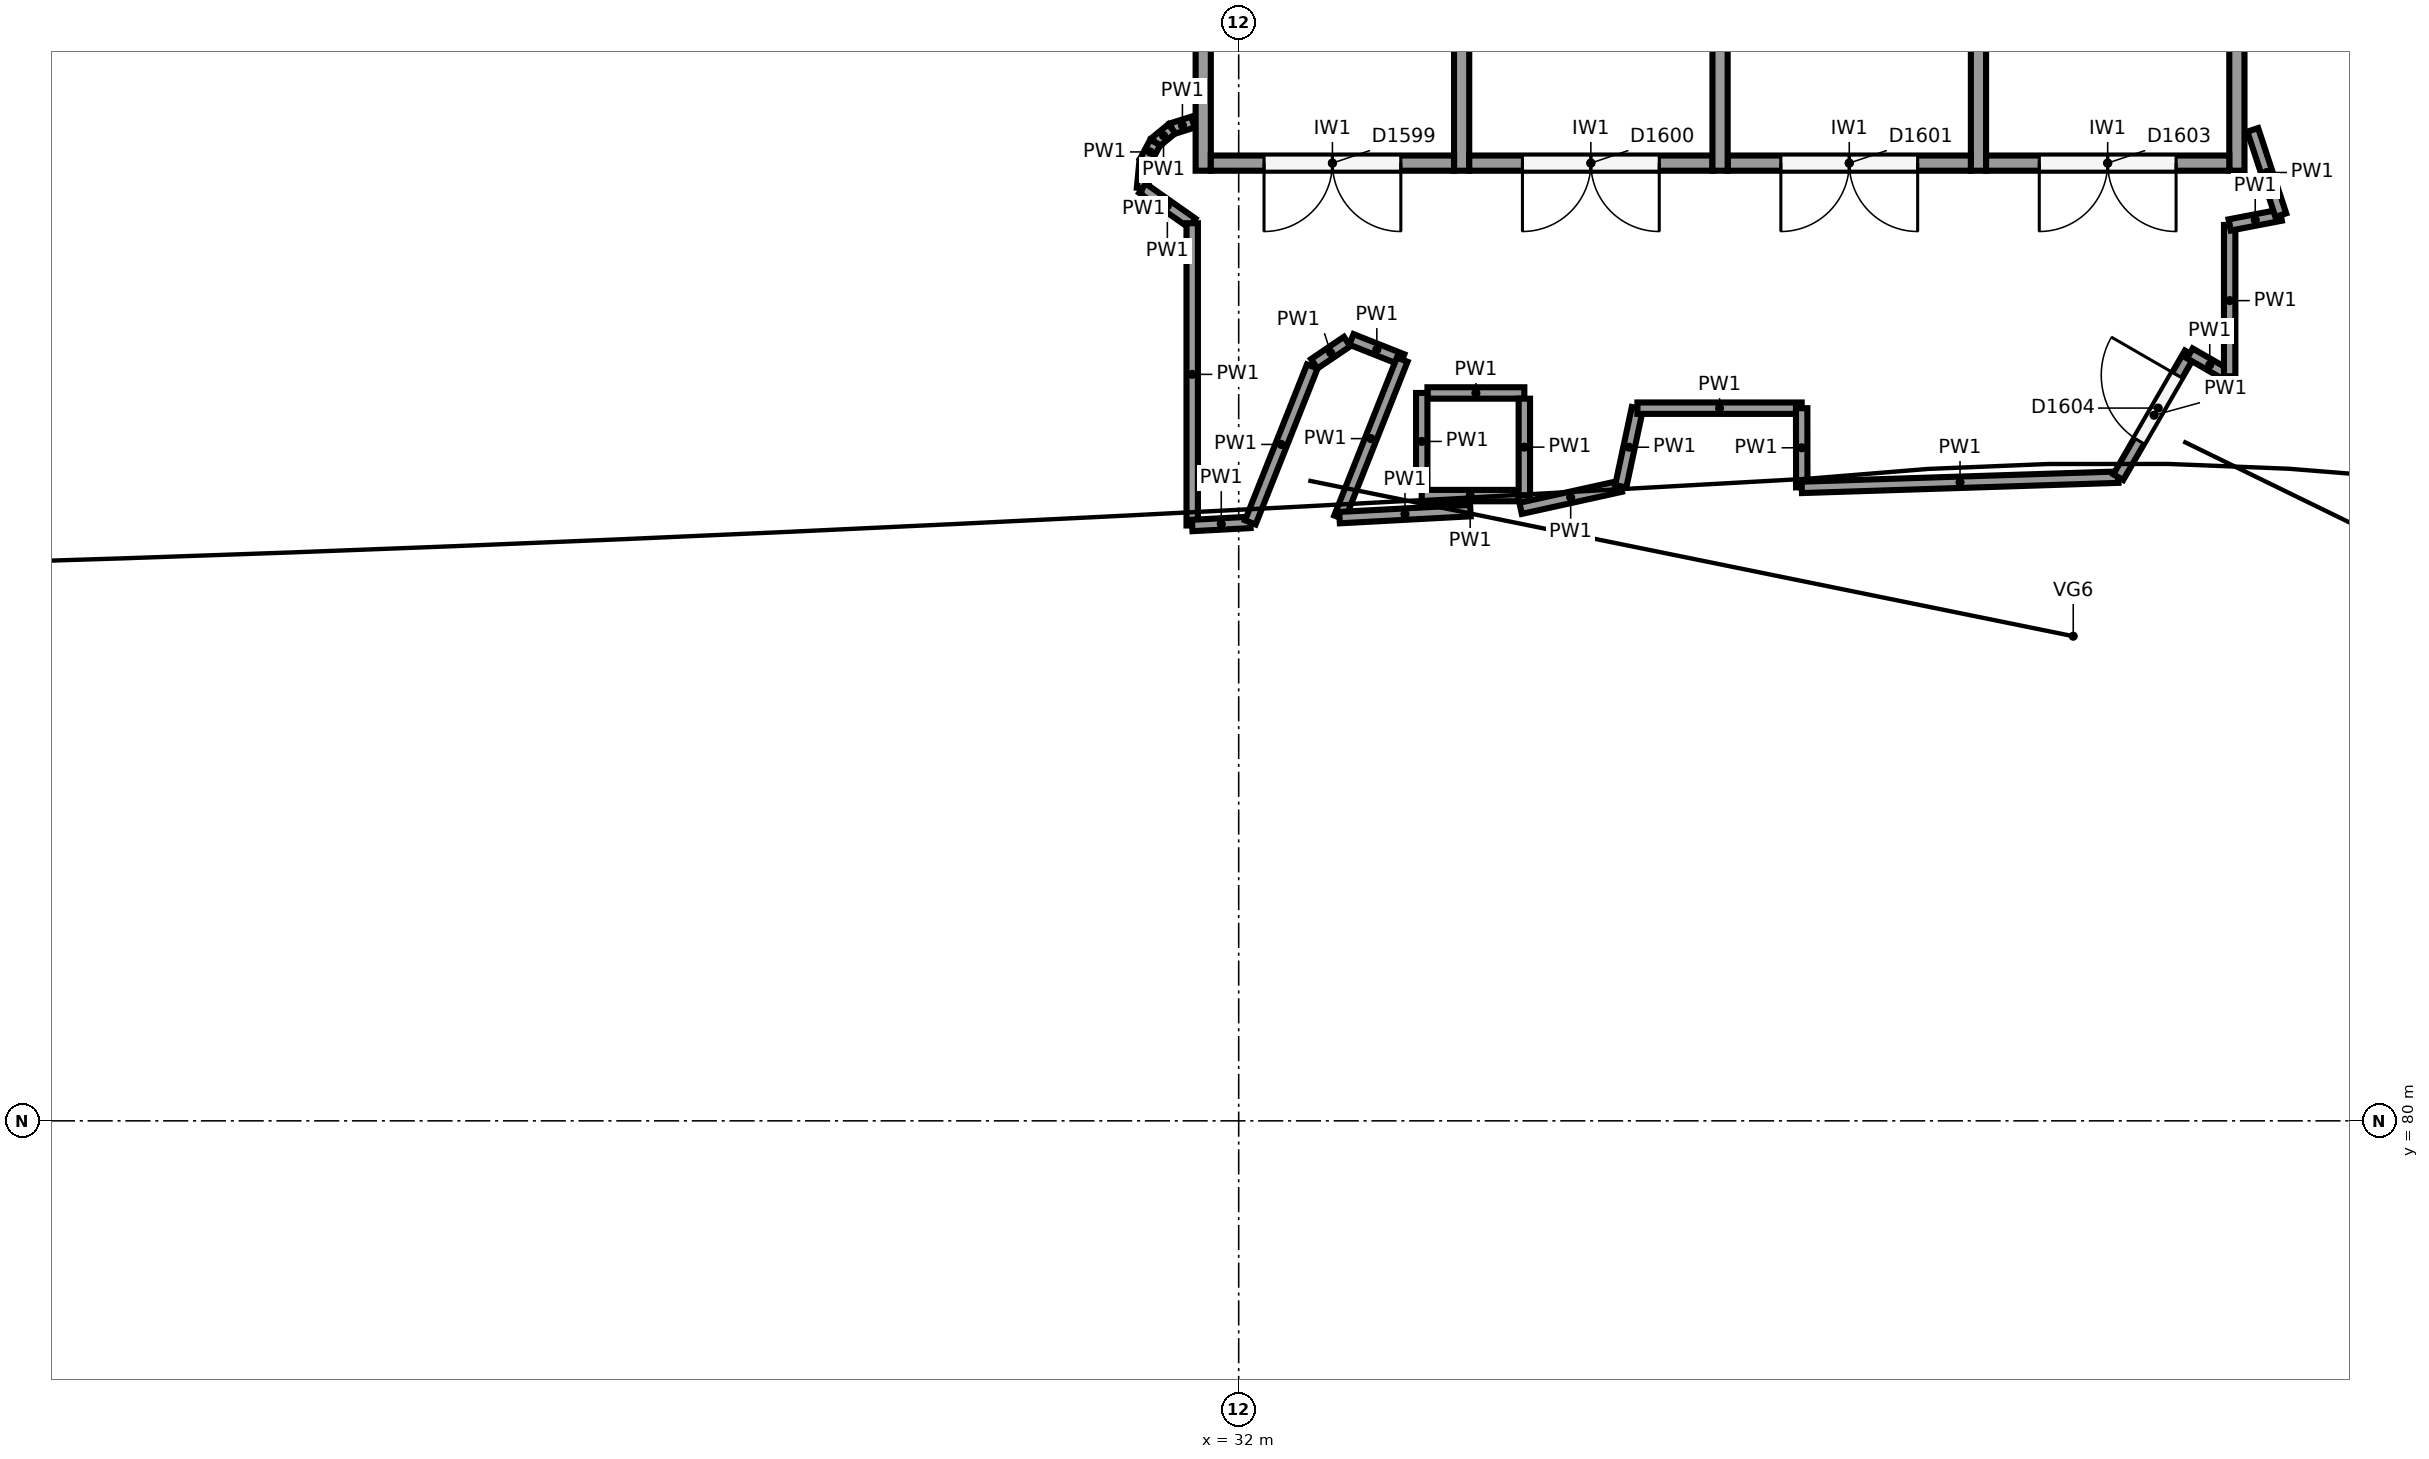
"""IFC4 building model, lengths in metres.
Left out: names, types, materials, properties, quantities, classifications, styles, units other than length and angle.
Written with IfcOpenShell. Run it as: python <this file> out.ifc"""

import sys

from ifc_helpers import new_model, si_unit, direction, frame, frame_2d, origin, origin_2d, place, context, subcontext, project, spatial, rectangle, circle, extrude, element, fill, save


model = new_model("IFC4")
c1 = context("Model", 3, precision=1e-05, world=origin(), true_north=direction((0.0, 1.0)))
c2 = subcontext(c1, "Body", "Model", "MODEL_VIEW")
j1 = project(units=[si_unit("LENGTHUNIT", "METRE"), si_unit("PLANEANGLEUNIT", "RADIAN")], contexts=[c1])
p1 = place(None, origin())
s1 = spatial("IfcSite", under=j1, at=p1, CompositionType="ELEMENT")
p2 = place(p1, origin())
s2 = spatial("IfcBuilding", under=s1, at=p2, CompositionType="ELEMENT")
p3 = place(p2, frame((0.0, 0.0, 24.0)))
s3 = spatial("IfcBuildingStorey", under=s2, at=p3, CompositionType="ELEMENT", Elevation=24.0)
p4 = place(p3, frame((46.333, 90.126, 0.0), z_axis=(0.0, 0.0, 1.0), x_axis=(1.0, 0.0, 0.0)))
e1 = element("IfcColumn", 1, at=p4, inside=s3, PredefinedType="COLUMN", context=c2, shape_type="SweptSolid", body=[
    extrude(circle(Radius=0.45, at=origin_2d()), origin(), (0.0, 0.0, 1.0), 4.15),
])
p5 = place(p3, frame((32.944, 90.551, 0.0), z_axis=(0.0, 0.0, 1.0), x_axis=(1.0, 0.0, 0.0)))
e2 = element("IfcColumn", 2, at=p5, inside=s3, PredefinedType="COLUMN", context=c2, shape_type="SweptSolid", body=[
    extrude(circle(Radius=0.55, at=origin_2d()), origin(), (0.0, 0.0, 1.0), 6.0),
])
p6 = place(p3, frame((20.65, 89.656, 0.0), z_axis=(0.0, 0.0, 1.0), x_axis=(1.0, 0.0, 0.0)))
e3 = element("IfcColumn", 3, at=p6, inside=s3, PredefinedType="COLUMN", context=c2, shape_type="SweptSolid", body=[
    extrude(circle(Radius=0.45, at=origin_2d()), origin(), (0.0, 0.0, 1.0), 4.8),
])
for number, where, z_axis, x_axis in (
    (4, (45.133, 101.6, 0.0), (0.0, 0.0, 1.0), (0.0, -1.0, 0.0)),
    (5, (38.333, 101.6, 0.0), (0.0, 0.0, 1.0), (0.0, -1.0, 0.0)),
    (6, (31.533, 101.6, 0.0), (0.0, 0.0, 1.0), (0.0, -1.0, 0.0)),
    (7, (41.733, 101.6, 0.0), (0.0, 0.0, 1.0), (0.0, -1.0, 0.0)),
    (8, (34.933, 101.6, 0.0), (0.0, 0.0, 1.0), (0.0, -1.0, 0.0)),
):
    element("IfcWall", number, at=place(p3, frame(where, z_axis=z_axis, x_axis=x_axis)), inside=s3, PredefinedType="SHEAR", context=c2, shape_type="SweptSolid", body=[
        extrude(rectangle(XDim=9.1, YDim=0.2, at=frame_2d((4.55, 0.0))), origin(), (0.0, 0.0, 1.0), 5.75),
    ])
p7 = place(p3, frame((45.033, 92.6, 0.0), z_axis=(0.0, 0.0, 1.0), x_axis=(-1.0, 0.0, 0.0)))
e9 = element("IfcWall", 9, at=p7, inside=s3, PredefinedType="SHEAR", context=c2, shape_type="SweptSolid", body=[
    extrude(rectangle(XDim=3.2, YDim=0.2, at=frame_2d((1.6, 0.0))), origin(), (0.0, 0.0, 1.0), 5.75),
])
p8 = place(p7, frame((0.7, 0.0, 0.0)))
e10 = element("IfcOpeningElement", 10, at=p8, cuts=e9, PredefinedType="OPENING", context=c2, shape_type="SweptSolid", body=[
    extrude(rectangle(XDim=1.8, YDim=2.1, at=frame_2d((0.9, 1.05))), frame((0.0, 0.11, 0.0), z_axis=(0.0, -1.0, 0.0), x_axis=(1.0, 0.0, 0.0)), (0.0, 0.0, 1.0), 0.22),
])
p9 = place(p3, frame((41.633, 92.6, 0.0), z_axis=(0.0, 0.0, 1.0), x_axis=(-1.0, 0.0, 0.0)))
e11 = element("IfcWall", 11, at=p9, inside=s3, PredefinedType="SHEAR", context=c2, shape_type="SweptSolid", body=[
    extrude(rectangle(XDim=3.2, YDim=0.2, at=frame_2d((1.6, 0.0))), origin(), (0.0, 0.0, 1.0), 5.75),
])
p10 = place(p9, frame((0.7, 0.0, 0.0)))
e12 = element("IfcOpeningElement", 12, at=p10, cuts=e11, PredefinedType="OPENING", context=c2, shape_type="SweptSolid", body=[
    extrude(rectangle(XDim=1.8, YDim=2.1, at=frame_2d((0.9, 1.05))), frame((0.0, 0.11, 0.0), z_axis=(0.0, -1.0, 0.0), x_axis=(1.0, 0.0, 0.0)), (0.0, 0.0, 1.0), 0.22),
])
p11 = place(p3, frame((38.233, 92.6, 0.0), z_axis=(0.0, 0.0, 1.0), x_axis=(-1.0, 0.0, 0.0)))
e13 = element("IfcWall", 13, at=p11, inside=s3, PredefinedType="SHEAR", context=c2, shape_type="SweptSolid", body=[
    extrude(rectangle(XDim=3.2, YDim=0.2, at=frame_2d((1.6, 0.0))), origin(), (0.0, 0.0, 1.0), 5.75),
])
p12 = place(p11, frame((0.7, 0.0, 0.0)))
e14 = element("IfcOpeningElement", 14, at=p12, cuts=e13, PredefinedType="OPENING", context=c2, shape_type="SweptSolid", body=[
    extrude(rectangle(XDim=1.8, YDim=2.1, at=frame_2d((0.9, 1.05))), frame((0.0, 0.11, 0.0), z_axis=(0.0, -1.0, 0.0), x_axis=(1.0, 0.0, 0.0)), (0.0, 0.0, 1.0), 0.22),
])
p13 = place(p3, frame((34.833, 92.6, 0.0), z_axis=(0.0, 0.0, 1.0), x_axis=(-1.0, 0.0, 0.0)))
e15 = element("IfcWall", 15, at=p13, inside=s3, PredefinedType="SHEAR", context=c2, shape_type="SweptSolid", body=[
    extrude(rectangle(XDim=3.2, YDim=0.2, at=frame_2d((1.6, 0.0))), origin(), (0.0, 0.0, 1.0), 5.75),
])
p14 = place(p13, frame((0.7, 0.0, 0.0)))
e16 = element("IfcOpeningElement", 16, at=p14, cuts=e15, PredefinedType="OPENING", context=c2, shape_type="SweptSolid", body=[
    extrude(rectangle(XDim=1.8, YDim=2.1, at=frame_2d((0.9, 1.05))), frame((0.0, 0.11, 0.0), z_axis=(0.0, -1.0, 0.0), x_axis=(1.0, 0.0, 0.0)), (0.0, 0.0, 1.0), 0.22),
])
p15 = place(p3, frame((35.758, 89.576, 0.0), z_axis=(0.0, 0.0, 1.0), x_axis=(-1.0, 0.0, 0.0)))
e17 = element("IfcWall", 17, at=p15, inside=s3, PredefinedType="PARTITIONING", context=c2, shape_type="SweptSolid", body=[
    extrude(rectangle(XDim=1.275, YDim=0.15, at=frame_2d((0.637, 0.0))), origin(), (0.0, 0.0, 1.0), 5.4),
])
for number, where, z_axis, x_axis in (
    (18, (34.408, 89.576, 0.0), (0.0, 0.0, 1.0), (0.0, -1.0, 0.0)),
    (19, (34.408, 88.226, 0.0), (0.0, 0.0, 1.0), (1.0, 0.0, 0.0)),
    (20, (35.758, 88.226, 0.0), (0.0, 0.0, 1.0), (0.0, 1.0, 0.0)),
):
    element("IfcWall", number, at=place(p3, frame(where, z_axis=z_axis, x_axis=x_axis)), inside=s3, PredefinedType="PARTITIONING", context=c2, shape_type="SweptSolid", body=[
        extrude(rectangle(XDim=1.275, YDim=0.15, at=frame_2d((0.638, 0.0))), origin(), (0.0, 0.0, 1.0), 5.4),
    ])
p16 = place(p3, frame((31.399, 93.139, 0.0), z_axis=(0.0, 0.0, 1.0), x_axis=(-0.954062086302, -0.299608970962, 0.0)))
e21 = element("IfcWall", 21, at=p16, inside=s3, PredefinedType="PARTITIONING", context=c2, shape_type="SweptSolid", body=[
    extrude(rectangle(XDim=0.292, YDim=0.15, at=frame_2d((0.146, 0.0))), origin(), (0.0, 0.0, 1.0), 5.4),
])
p17 = place(p3, frame((31.121, 93.052, 0.0), z_axis=(0.0, 0.0, 1.0), x_axis=(-0.773073370483, -0.634316611678, 0.0)))
e22 = element("IfcWall", 22, at=p17, inside=s3, PredefinedType="PARTITIONING", context=c2, shape_type="SweptSolid", body=[
    extrude(rectangle(XDim=0.283, YDim=0.15, at=frame_2d((0.142, 0.0))), origin(), (0.0, 0.0, 1.0), 5.4),
])
p18 = place(p3, frame((30.902, 92.872, 0.0), z_axis=(0.0, 0.0, 1.0), x_axis=(-0.471169334347, -0.882042775817, 0.0)))
e23 = element("IfcWall", 23, at=p18, inside=s3, PredefinedType="PARTITIONING", context=c2, shape_type="SweptSolid", body=[
    extrude(rectangle(XDim=0.283, YDim=0.15, at=frame_2d((0.142, 0.0))), origin(), (0.0, 0.0, 1.0), 5.4),
])
p19 = place(p3, frame((30.768, 92.622, 0.0), z_axis=(0.0, 0.0, 1.0), x_axis=(-0.094321730408, -0.995541767669, 0.0)))
e24 = element("IfcWall", 24, at=p19, inside=s3, PredefinedType="PARTITIONING", context=c2, shape_type="SweptSolid", body=[
    extrude(rectangle(XDim=0.354, YDim=0.15, at=frame_2d((0.177, 0.0))), origin(), (0.0, 0.0, 1.0), 5.4),
])
p20 = place(p3, frame((30.735, 92.269, 0.0), z_axis=(0.0, 0.0, 1.0), x_axis=(0.817779793702, -0.575531240693, 0.0)))
e25 = element("IfcWall", 25, at=p20, inside=s3, PredefinedType="PARTITIONING", context=c2, shape_type="SweptSolid", body=[
    extrude(rectangle(XDim=0.799, YDim=0.15, at=frame_2d((0.399, 0.0))), origin(), (0.0, 0.0, 1.0), 5.4),
])
p21 = place(p3, frame((31.388, 91.809, 0.0), z_axis=(0.0, 0.0, 1.0), x_axis=(0.0, -1.0, 0.0)))
e26 = element("IfcWall", 26, at=p21, inside=s3, PredefinedType="PARTITIONING", context=c2, shape_type="SweptSolid", body=[
    extrude(rectangle(XDim=3.977, YDim=0.15, at=frame_2d((1.988, 0.0))), origin(), (0.0, 0.0, 1.0), 5.4),
])
p22 = place(p3, frame((31.388, 87.833, 0.0), z_axis=(0.0, 0.0, 1.0), x_axis=(0.998582386306, 0.053227979098, 0.0)))
e27 = element("IfcWall", 27, at=p22, inside=s3, PredefinedType="PARTITIONING", context=c2, shape_type="SweptSolid", body=[
    extrude(rectangle(XDim=0.766, YDim=0.15, at=frame_2d((0.383, 0.0))), origin(), (0.0, 0.0, 1.0), 5.4),
])
p23 = place(p3, frame((32.153, 87.873, 0.0), z_axis=(0.0, 0.0, 1.0), x_axis=(0.369177653247, 0.929358843689, 0.0)))
e28 = element("IfcWall", 28, at=p23, inside=s3, PredefinedType="PARTITIONING", context=c2, shape_type="SweptSolid", body=[
    extrude(rectangle(XDim=2.208, YDim=0.15, at=frame_2d((1.104, 0.0))), origin(), (0.0, 0.0, 1.0), 5.4),
])
p24 = place(p3, frame((33.483, 90.281, 0.0), z_axis=(0.0, 0.0, 1.0), x_axis=(0.929154097391, -0.369692660599, 0.0)))
e29 = element("IfcWall", 29, at=p24, inside=s3, PredefinedType="PARTITIONING", context=c2, shape_type="SweptSolid", body=[
    extrude(rectangle(XDim=0.719, YDim=0.15, at=frame_2d((0.36, 0.0))), origin(), (0.0, 0.0, 1.0), 5.4),
])
p25 = place(p3, frame((34.152, 90.015, 0.0), z_axis=(0.0, 0.0, 1.0), x_axis=(-0.368716786322, -0.929541785766, 0.0)))
e30 = element("IfcWall", 30, at=p25, inside=s3, PredefinedType="PARTITIONING", context=c2, shape_type="SweptSolid", body=[
    extrude(rectangle(XDim=2.237, YDim=0.15, at=frame_2d((1.118, 0.0))), origin(), (0.0, 0.0, 1.0), 5.4),
])
p26 = place(p3, frame((33.327, 87.936, 0.0), z_axis=(0.0, 0.0, 1.0), x_axis=(0.998566510948, 0.053524977473, 0.0)))
e31 = element("IfcWall", 31, at=p26, inside=s3, PredefinedType="PARTITIONING", context=c2, shape_type="SweptSolid", body=[
    extrude(rectangle(XDim=1.724, YDim=0.15, at=frame_2d((0.862, 0.0))), origin(), (0.0, 0.0, 1.0), 5.4),
])
p27 = place(p3, frame((35.709, 88.058, 0.0), z_axis=(0.0, 0.0, 1.0), x_axis=(0.976543359958, 0.215320844608, 0.0)))
e32 = element("IfcWall", 32, at=p27, inside=s3, PredefinedType="PARTITIONING", context=c2, shape_type="SweptSolid", body=[
    extrude(rectangle(XDim=1.349, YDim=0.15, at=frame_2d((0.675, 0.0))), origin(), (0.0, 0.0, 1.0), 5.4),
])
p28 = place(p3, frame((37.027, 88.349, 0.0), z_axis=(0.0, 0.0, 1.0), x_axis=(0.208656251107, 0.97798904333, 0.0)))
e33 = element("IfcWall", 33, at=p28, inside=s3, PredefinedType="PARTITIONING", context=c2, shape_type="SweptSolid", body=[
    extrude(rectangle(XDim=1.051, YDim=0.15, at=frame_2d((0.525, 0.0))), origin(), (0.0, 0.0, 1.0), 5.4),
])
p29 = place(p3, frame((37.246, 89.376, 0.0), z_axis=(0.0, 0.0, 1.0), x_axis=(0.99999999362, -0.000112956059, 0.0)))
e34 = element("IfcWall", 34, at=p29, inside=s3, PredefinedType="PARTITIONING", context=c2, shape_type="SweptSolid", body=[
    extrude(rectangle(XDim=2.161, YDim=0.15, at=frame_2d((1.081, 0.0))), origin(), (0.0, 0.0, 1.0), 5.4),
])
p30 = place(p3, frame((39.407, 89.376, 0.0), z_axis=(0.0, 0.0, 1.0), x_axis=(0.0011715081, -0.999999313784, 0.0)))
e35 = element("IfcWall", 35, at=p30, inside=s3, PredefinedType="PARTITIONING", context=c2, shape_type="SweptSolid", body=[
    extrude(rectangle(XDim=1.042, YDim=0.15, at=frame_2d((0.521, 0.0))), origin(), (0.0, 0.0, 1.0), 5.4),
])
p31 = place(p3, frame((39.408, 88.334, 0.0), z_axis=(0.0, 0.0, 1.0), x_axis=(0.99948054063, 0.032228076294, 0.0)))
e36 = element("IfcWall", 36, at=p31, inside=s3, PredefinedType="PARTITIONING", context=c2, shape_type="SweptSolid", body=[
    extrude(rectangle(XDim=4.167, YDim=0.15, at=frame_2d((2.083, 0.0))), origin(), (0.0, 0.0, 1.0), 5.4),
])
p32 = place(p3, frame((43.573, 88.468, 0.0), z_axis=(0.0, 0.0, 1.0), x_axis=(0.500493829044, 0.865740103662, 0.0)))
e37 = element("IfcWall", 37, at=p32, inside=s3, PredefinedType="PARTITIONING", context=c2, shape_type="SweptSolid", body=[
    extrude(rectangle(XDim=1.881, YDim=0.15, at=frame_2d((0.94, 0.0))), origin(), (0.0, 0.0, 1.0), 5.4),
])
p33 = place(p32, frame((0.55, 0.0, 0.0)))
e38 = element("IfcOpeningElement", 38, at=p33, cuts=e37, PredefinedType="OPENING", context=c2, shape_type="SweptSolid", body=[
    extrude(rectangle(XDim=1.0, YDim=2.1, at=frame_2d((0.5, 1.05))), frame((0.0, 0.085, 0.0), z_axis=(0.0, -1.0, 0.0), x_axis=(1.0, 0.0, 0.0)), (0.0, 0.0, 1.0), 0.17),
])
p34 = place(p3, frame((44.514, 90.097, 0.0), z_axis=(0.0, 0.0, 1.0), x_axis=(0.866997901494, -0.498311788749, 0.0)))
e39 = element("IfcWall", 39, at=p34, inside=s3, PredefinedType="PARTITIONING", context=c2, shape_type="SweptSolid", body=[
    extrude(rectangle(XDim=0.604, YDim=0.15, at=frame_2d((0.302, 0.0))), origin(), (0.0, 0.0, 1.0), 5.4),
])
p35 = place(p3, frame((45.038, 89.795, 0.0), z_axis=(0.0, 0.0, 1.0), x_axis=(0.0, 1.0, 0.0)))
e40 = element("IfcWall", 40, at=p35, inside=s3, PredefinedType="PARTITIONING", context=c2, shape_type="SweptSolid", body=[
    extrude(rectangle(XDim=1.991, YDim=0.15, at=frame_2d((0.996, 0.0))), origin(), (0.0, 0.0, 1.0), 5.4),
])
p36 = place(p3, frame((45.038, 91.787, 0.0), z_axis=(0.0, 0.0, 1.0), x_axis=(0.982006446981, 0.18884739365, 0.0)))
e41 = element("IfcWall", 41, at=p36, inside=s3, PredefinedType="PARTITIONING", context=c2, shape_type="SweptSolid", body=[
    extrude(rectangle(XDim=0.685, YDim=0.15, at=frame_2d((0.343, 0.0))), origin(), (0.0, 0.0, 1.0), 5.4),
])
p37 = place(p3, frame((45.711, 91.916, 0.0), z_axis=(0.0, 0.0, 1.0), x_axis=(-0.312505036406, 0.949916102727, 0.0)))
e42 = element("IfcWall", 42, at=p37, inside=s3, PredefinedType="PARTITIONING", context=c2, shape_type="SweptSolid", body=[
    extrude(rectangle(XDim=1.181, YDim=0.15, at=frame_2d((0.591, 0.0))), origin(), (0.0, 0.0, 1.0), 5.4),
])
p38 = place(p3, frame((32.994, 89.961, 0.0), z_axis=(0.0, 0.0, 1.0), x_axis=(0.828430407169, 0.560092010726, 0.0)))
e43 = element("IfcWall", 43, at=p38, inside=s3, PredefinedType="PARTITIONING", context=c2, shape_type="SweptSolid", body=[
    extrude(rectangle(XDim=0.521, YDim=0.15, at=frame_2d((0.261, 0.0))), origin(), (0.0, 0.0, 1.0), 5.4),
])
p39 = place(p8, origin())
e44 = element("IfcDoor", 44, at=p39, inside=s3, OperationType="DOUBLE_DOOR_SINGLE_SWING", PredefinedType="DOOR", context=c2, shape_type="SweptSolid", body=[
    extrude(rectangle(XDim=1.8, YDim=2.1, at=frame_2d((0.9, 1.05))), frame((0.0, 0.025, 0.0), z_axis=(0.0, -1.0, 0.0), x_axis=(1.0, 0.0, 0.0)), (0.0, 0.0, 1.0), 0.05),
])
fill(e10, e44)
p40 = place(p10, origin())
e45 = element("IfcDoor", 45, at=p40, inside=s3, OperationType="DOUBLE_DOOR_SINGLE_SWING", PredefinedType="DOOR", context=c2, shape_type="SweptSolid", body=[
    extrude(rectangle(XDim=1.8, YDim=2.1, at=frame_2d((0.9, 1.05))), frame((0.0, 0.025, 0.0), z_axis=(0.0, -1.0, 0.0), x_axis=(1.0, 0.0, 0.0)), (0.0, 0.0, 1.0), 0.05),
])
fill(e12, e45)
p41 = place(p12, origin())
e46 = element("IfcDoor", 46, at=p41, inside=s3, OperationType="DOUBLE_DOOR_SINGLE_SWING", PredefinedType="DOOR", context=c2, shape_type="SweptSolid", body=[
    extrude(rectangle(XDim=1.8, YDim=2.1, at=frame_2d((0.9, 1.05))), frame((0.0, 0.025, 0.0), z_axis=(0.0, -1.0, 0.0), x_axis=(1.0, 0.0, 0.0)), (0.0, 0.0, 1.0), 0.05),
])
fill(e14, e46)
p42 = place(p14, origin())
e47 = element("IfcDoor", 47, at=p42, inside=s3, OperationType="DOUBLE_DOOR_SINGLE_SWING", PredefinedType="DOOR", context=c2, shape_type="SweptSolid", body=[
    extrude(rectangle(XDim=1.8, YDim=2.1, at=frame_2d((0.9, 1.05))), frame((0.0, 0.025, 0.0), z_axis=(0.0, -1.0, 0.0), x_axis=(1.0, 0.0, 0.0)), (0.0, 0.0, 1.0), 0.05),
])
fill(e16, e47)
p43 = place(p33, origin())
e48 = element("IfcDoor", 48, at=p43, inside=s3, OperationType="SINGLE_SWING_RIGHT", PredefinedType="DOOR", context=c2, shape_type="SweptSolid", body=[
    extrude(rectangle(XDim=1.0, YDim=2.1, at=frame_2d((0.5, 1.05))), frame((0.0, 0.025, 0.0), z_axis=(0.0, -1.0, 0.0), x_axis=(1.0, 0.0, 0.0)), (0.0, 0.0, 1.0), 0.05),
])
fill(e38, e48)
save(model, sys.argv[1])
